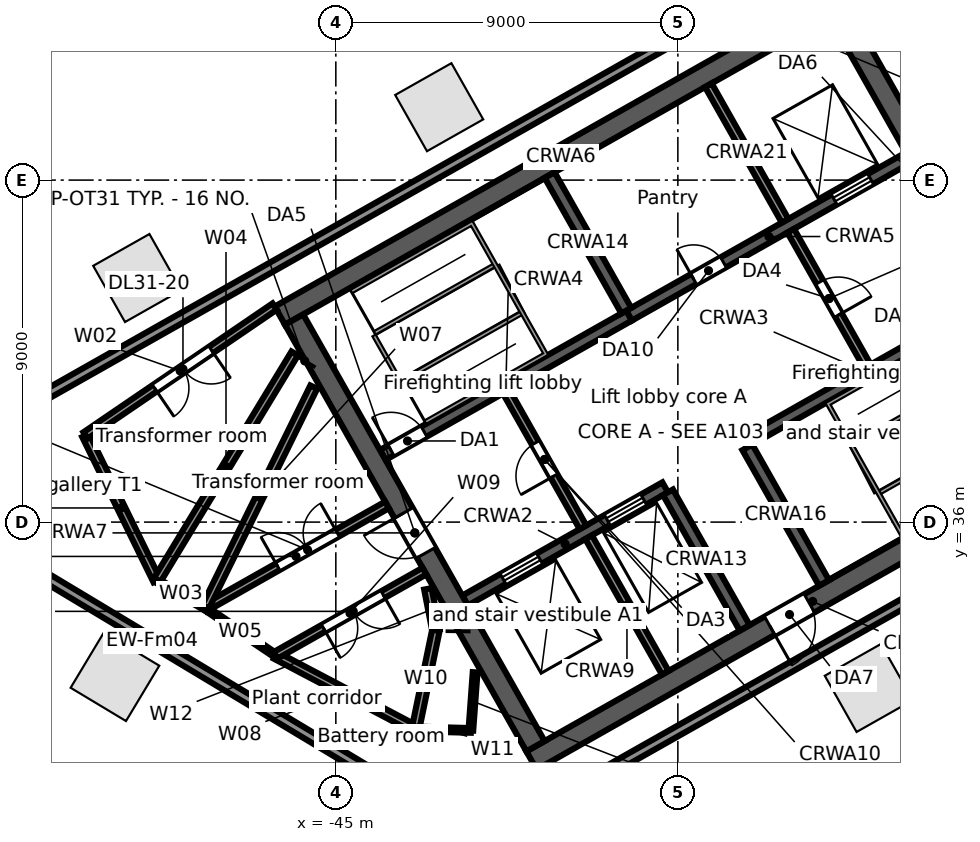
"""IFC4 building model, lengths in metres.
Left out: names, types, materials, properties, quantities, classifications, styles, units other than length and angle.
Written with IfcOpenShell. Run it as: python <this file> out.ifc"""

import sys

from ifc_helpers import new_model, si_unit, direction, frame, frame_2d, origin, origin_2d, place, context, subcontext, project, spatial, rectangle, extrude, element, fill, save


model = new_model("IFC4")
c1 = context("Model", 3, precision=1e-05, world=origin(), true_north=direction((0.0, 1.0)))
c2 = subcontext(c1, "Body", "Model", "MODEL_VIEW")
j1 = project(units=[si_unit("LENGTHUNIT", "METRE"), si_unit("PLANEANGLEUNIT", "RADIAN")], contexts=[c1])
p1 = place(None, origin())
s1 = spatial("IfcSite", under=j1, at=p1, CompositionType="ELEMENT")
p2 = place(p1, origin())
s2 = spatial("IfcBuilding", under=s1, at=p2, CompositionType="ELEMENT")
p3 = place(p2, frame((0.0, 0.0, 149.9)))
s3 = spatial("IfcBuildingStorey", under=s2, at=p3, CompositionType="ELEMENT", Elevation=149.9)
for number, where, z_axis, x_axis in (
    (1, (-42.28, 46.919, 0.0), (0.0, 0.0, 1.0), (-0.87, -0.492, 0.0)),
    (2, (-50.226, 42.423, 0.0), (0.0, 0.0, 1.0), (-0.87, -0.492, 0.0)),
    (3, (-50.812, 31.931, 0.0), (0.0, 0.0, 1.0), (0.857, -0.515, 0.0)),
    (4, (-30.976, 31.635, 0.0), (0.0, 0.0, 1.0), (0.87, 0.492, 0.0)),
):
    element("IfcColumn", number, at=place(p3, frame(where, z_axis=z_axis, x_axis=x_axis)), inside=s3, PredefinedType="COLUMN", context=c2, shape_type="SweptSolid", body=[
        extrude(rectangle(XDim=1.7, YDim=1.7, at=origin_2d()), origin(), (0.0, 0.0, 1.0), 5.0),
    ])
p4 = place(p3, frame((-56.251, 37.302, 0.0), z_axis=(0.0, 0.0, 1.0), x_axis=(0.87035543516, 0.49242402103, 0.0)))
e5 = element("IfcWall", 5, at=p4, inside=s3, PredefinedType="STANDARD", context=c2, shape_type="SweptSolid", body=[
    extrude(rectangle(XDim=62.067, YDim=0.25, at=frame_2d((31.033, 0.0))), origin(), (0.0, 0.0, 1.0), 3.872),
])
p5 = place(p3, frame((-43.407, 28.998, 0.0), z_axis=(0.0, 0.0, 1.0), x_axis=(-0.857168059559, 0.515036811958, 0.0)))
e6 = element("IfcWall", 6, at=p5, inside=s3, PredefinedType="STANDARD", context=c2, shape_type="SweptSolid", body=[
    extrude(rectangle(XDim=14.994, YDim=0.25, at=frame_2d((7.497, 0.0))), origin(), (0.0, 0.0, 1.0), 3.98),
])
p6 = place(p3, frame((-0.364, 50.666, 0.0), z_axis=(0.0, 0.0, 1.0), x_axis=(-0.870355021882, -0.492424751494, 0.0)))
e7 = element("IfcWall", 7, at=p6, inside=s3, PredefinedType="STANDARD", context=c2, shape_type="SweptSolid", body=[
    extrude(rectangle(XDim=44.126, YDim=0.25, at=frame_2d((22.063, 0.0))), origin(), (0.0, 0.0, 1.0), 3.768),
])
p7 = place(p3, frame((-39.85, 29.727, 0.0), z_axis=(0.0, 0.0, 1.0), x_axis=(0.870359753402, 0.492416388494, 0.0)))
e8 = element("IfcWall", 8, at=p7, inside=s3, PredefinedType="SOLIDWALL", context=c2, shape_type="SweptSolid", body=[
    extrude(rectangle(XDim=17.0, YDim=0.55, at=frame_2d((8.5, 0.0))), origin(), (0.0, 0.0, 1.0), 4.68),
])
p8 = place(p7, frame((7.2, 0.0, 0.0)))
e9 = element("IfcOpeningElement", 9, at=p8, cuts=e8, PredefinedType="OPENING", context=c2, shape_type="SweptSolid", body=[
    extrude(rectangle(XDim=1.2, YDim=2.1, at=frame_2d((0.6, 1.05))), frame((0.0, 0.285, 0.0), z_axis=(0.0, -1.0, 0.0), x_axis=(1.0, 0.0, 0.0)), (0.0, 0.0, 1.0), 0.57),
])
p9 = place(p3, frame((-41.6, 33.936, 0.0), z_axis=(0.0, 0.0, 1.0), x_axis=(0.870348557882, 0.492436176365, 0.0)))
e10 = element("IfcWall", 10, at=p9, inside=s3, PredefinedType="SOLIDWALL", context=c2, shape_type="SweptSolid", body=[
    extrude(rectangle(XDim=6.05, YDim=0.3, at=frame_2d((3.025, 0.0))), origin(), (0.0, 0.0, 1.0), 4.68),
])
p10 = place(p9, frame((1.15, 0.0, 0.0)))
e11 = element("IfcOpeningElement", 11, at=p10, cuts=e10, PredefinedType="OPENING", context=c2, shape_type="SweptSolid", body=[
    extrude(rectangle(XDim=1.1, YDim=2.1, at=frame_2d((0.55, 1.05))), frame((0.0, 0.16, 0.0), z_axis=(0.0, -1.0, 0.0), x_axis=(1.0, 0.0, 0.0)), (0.0, 0.0, 1.0), 0.32),
])
p11 = place(p9, frame((4.3, 0.0, 0.0)))
e12 = element("IfcOpeningElement", 12, at=p11, cuts=e10, PredefinedType="OPENING", context=c2, shape_type="SweptSolid", body=[
    extrude(rectangle(XDim=1.1, YDim=2.1, at=frame_2d((0.55, 1.05))), frame((0.0, 0.16, 0.0), z_axis=(0.0, -1.0, 0.0), x_axis=(1.0, 0.0, 0.0)), (0.0, 0.0, 1.0), 0.32),
])
p12 = place(p3, frame((-34.245, 38.097, 0.0), z_axis=(0.0, 0.0, 1.0), x_axis=(0.870360741098, 0.49241464271, 0.0)))
e13 = element("IfcWall", 13, at=p12, inside=s3, PredefinedType="SOLIDWALL", context=c2, shape_type="SweptSolid", body=[
    extrude(rectangle(XDim=7.45, YDim=0.3, at=frame_2d((3.725, 0.0))), origin(), (0.0, 0.0, 1.0), 4.68),
])
p13 = place(p12, frame((6.2, 0.0, 0.0)))
e14 = element("IfcOpeningElement", 14, at=p13, cuts=e13, PredefinedType="OPENING", context=c2, shape_type="SweptSolid", body=[
    extrude(rectangle(XDim=1.0, YDim=2.1, at=frame_2d((0.5, 1.05))), frame((0.0, 0.16, 0.0), z_axis=(0.0, -1.0, 0.0), x_axis=(1.0, 0.0, 0.0)), (0.0, 0.0, 1.0), 0.32),
])
p14 = place(p3, frame((-43.766, 37.766, 0.0), z_axis=(0.0, 0.0, 1.0), x_axis=(0.870346696097, 0.492439466932, 0.0)))
e15 = element("IfcWall", 15, at=p14, inside=s3, PredefinedType="SOLIDWALL", context=c2, shape_type="SweptSolid", body=[
    extrude(rectangle(XDim=7.45, YDim=0.3, at=frame_2d((3.725, 0.0))), origin(), (0.0, 0.0, 1.0), 4.68),
])
p15 = place(p14, frame((0.25, 0.0, 0.0)))
e16 = element("IfcOpeningElement", 16, at=p15, cuts=e15, PredefinedType="OPENING", context=c2, shape_type="SweptSolid", body=[
    extrude(rectangle(XDim=1.0, YDim=2.1, at=frame_2d((0.5, 1.05))), frame((0.0, 0.16, 0.0), z_axis=(0.0, -1.0, 0.0), x_axis=(1.0, 0.0, 0.0)), (0.0, 0.0, 1.0), 0.32),
])
p16 = place(p3, frame((-37.282, 41.435, 0.0), z_axis=(0.0, 0.0, 1.0), x_axis=(0.870359895813, 0.492416136779, 0.0)))
e17 = element("IfcWall", 17, at=p16, inside=s3, PredefinedType="SOLIDWALL", context=c2, shape_type="SweptSolid", body=[
    extrude(rectangle(XDim=8.45, YDim=0.3, at=frame_2d((4.225, 0.0))), origin(), (0.0, 0.0, 1.0), 4.68),
])
p17 = place(p16, frame((6.2, 0.0, 0.0)))
e18 = element("IfcOpeningElement", 18, at=p17, cuts=e17, PredefinedType="OPENING", context=c2, shape_type="SweptSolid", body=[
    extrude(rectangle(XDim=1.1, YDim=2.1, at=frame_2d((0.55, 1.05))), frame((0.0, 0.16, 0.0), z_axis=(0.0, -1.0, 0.0), x_axis=(1.0, 0.0, 0.0)), (0.0, 0.0, 1.0), 0.32),
])
p18 = place(p16, frame((1.95, 0.0, 0.0)))
e19 = element("IfcOpeningElement", 19, at=p18, cuts=e17, PredefinedType="OPENING", context=c2, shape_type="SweptSolid", body=[
    extrude(rectangle(XDim=0.9, YDim=2.1, at=frame_2d((0.45, 1.05))), frame((0.0, 0.16, 0.0), z_axis=(0.0, -1.0, 0.0), x_axis=(1.0, 0.0, 0.0)), (0.0, 0.0, 1.0), 0.32),
])
p19 = place(p3, frame((-46.473, 41.434, 0.0), z_axis=(0.0, 0.0, 1.0), x_axis=(0.870359753402, 0.492416388494, 0.0)))
e20 = element("IfcWall", 20, at=p19, inside=s3, PredefinedType="SOLIDWALL", context=c2, shape_type="SweptSolid", body=[
    extrude(rectangle(XDim=17.0, YDim=0.55, at=frame_2d((8.5, 0.0))), origin(), (0.0, 0.0, 1.0), 4.68),
])
p20 = place(p3, frame((-46.098, 41.33, 0.0), z_axis=(0.0, 0.0, 1.0), x_axis=(0.492418910884, -0.870358326325, 0.0)))
e21 = element("IfcWall", 21, at=p20, inside=s3, PredefinedType="SOLIDWALL", context=c2, shape_type="SweptSolid", body=[
    extrude(rectangle(XDim=12.9, YDim=0.55, at=frame_2d((6.45, 0.0))), origin(), (0.0, 0.0, 1.0), 4.68),
])
p21 = place(p20, frame((5.85, 0.0, 0.0)))
e22 = element("IfcOpeningElement", 22, at=p21, cuts=e21, PredefinedType="OPENING", context=c2, shape_type="SweptSolid", body=[
    extrude(rectangle(XDim=1.2, YDim=2.1, at=frame_2d((0.6, 1.05))), frame((0.0, 0.285, 0.0), z_axis=(0.0, -1.0, 0.0), x_axis=(1.0, 0.0, 0.0)), (0.0, 0.0, 1.0), 0.57),
])
p22 = place(p3, frame((-38.349, 35.603, 0.0), z_axis=(0.0, 0.0, 1.0), x_axis=(0.492382931784, -0.870378681085, 0.0)))
e23 = element("IfcWall", 23, at=p22, inside=s3, PredefinedType="SOLIDWALL", context=c2, shape_type="SweptSolid", body=[
    extrude(rectangle(XDim=4.1, YDim=0.2, at=frame_2d((2.05, 0.0))), origin(), (0.0, 0.0, 1.0), 4.68),
])
p23 = place(p3, frame((-40.516, 39.433, 0.0), z_axis=(0.0, 0.0, 1.0), x_axis=(0.492453559952, -0.87033872216, 0.0)))
e24 = element("IfcWall", 24, at=p23, inside=s3, PredefinedType="PARTITIONING", context=c2, shape_type="SweptSolid", body=[
    extrude(rectangle(XDim=4.1, YDim=0.2, at=frame_2d((2.05, 0.0))), origin(), (0.0, 0.0, 1.0), 4.68),
])
p24 = place(p23, frame((1.55, 0.0, 0.0)))
e25 = element("IfcOpeningElement", 25, at=p24, cuts=e24, PredefinedType="OPENING", context=c2, shape_type="SweptSolid", body=[
    extrude(rectangle(XDim=1.0, YDim=2.1, at=frame_2d((0.5, 1.05))), frame((0.0, 0.11, 0.0), z_axis=(0.0, -1.0, 0.0), x_axis=(1.0, 0.0, 0.0)), (0.0, 0.0, 1.0), 0.22),
])
p25 = place(p3, frame((-36.26, 36.785, 0.0), z_axis=(0.0, 0.0, 1.0), x_axis=(0.492408451753, -0.87036424366, 0.0)))
e26 = element("IfcWall", 26, at=p25, inside=s3, PredefinedType="SOLIDWALL", context=c2, shape_type="SweptSolid", body=[
    extrude(rectangle(XDim=4.1, YDim=0.3, at=frame_2d((2.05, 0.0))), origin(), (0.0, 0.0, 1.0), 4.68),
])
for number, where, z_axis, x_axis in (
    (27, (-39.375, 45.134, 0.0), (0.0, 0.0, 1.0), (0.492, -0.87, 0.0)),
    (28, (-34.171, 37.967, 0.0), (0.0, 0.0, 1.0), (0.492, -0.87, 0.0)),
):
    element("IfcWall", number, at=place(p3, frame(where, z_axis=z_axis, x_axis=x_axis)), inside=s3, PredefinedType="SOLIDWALL", context=c2, shape_type="SweptSolid", body=[
        extrude(rectangle(XDim=4.1, YDim=0.3, at=frame_2d((2.05, 0.0))), origin(), (0.0, 0.0, 1.0), 4.68),
    ])
p26 = place(p3, frame((-33.031, 43.667, 0.0), z_axis=(0.0, 0.0, 1.0), x_axis=(0.492408451753, -0.87036424366, 0.0)))
e29 = element("IfcWall", 29, at=p26, inside=s3, PredefinedType="PARTITIONING", context=c2, shape_type="SweptSolid", body=[
    extrude(rectangle(XDim=4.1, YDim=0.2, at=frame_2d((2.05, 0.0))), origin(), (0.0, 0.0, 1.0), 4.68),
])
p27 = place(p26, frame((1.55, 0.0, 0.0)))
e30 = element("IfcOpeningElement", 30, at=p27, cuts=e29, PredefinedType="OPENING", context=c2, shape_type="SweptSolid", body=[
    extrude(rectangle(XDim=1.0, YDim=2.1, at=frame_2d((0.5, 1.05))), frame((0.0, 0.11, 0.0), z_axis=(0.0, -1.0, 0.0), x_axis=(1.0, 0.0, 0.0)), (0.0, 0.0, 1.0), 0.22),
])
p28 = place(p3, frame((-35.197, 47.497, 0.0), z_axis=(0.0, 0.0, 1.0), x_axis=(0.492453559952, -0.87033872216, 0.0)))
e31 = element("IfcWall", 31, at=p28, inside=s3, PredefinedType="SOLIDWALL", context=c2, shape_type="SweptSolid", body=[
    extrude(rectangle(XDim=4.1, YDim=0.2, at=frame_2d((2.05, 0.0))), origin(), (0.0, 0.0, 1.0), 4.68),
])
p29 = place(p3, frame((-31.781, 49.43, 0.0), z_axis=(0.0, 0.0, 1.0), x_axis=(0.492427022044, -0.870353737259, 0.0)))
e32 = element("IfcWall", 32, at=p29, inside=s3, PredefinedType="SOLIDWALL", context=c2, shape_type="SweptSolid", body=[
    extrude(rectangle(XDim=12.9, YDim=0.55, at=frame_2d((6.45, 0.0))), origin(), (0.0, 0.0, 1.0), 4.68),
])
p30 = place(p29, frame((5.85, 0.0, 0.0)))
e33 = element("IfcOpeningElement", 33, at=p30, cuts=e32, PredefinedType="OPENING", context=c2, shape_type="SweptSolid", body=[
    extrude(rectangle(XDim=1.2, YDim=2.1, at=frame_2d((0.6, 1.05))), frame((0.0, 0.285, 0.0), z_axis=(0.0, -1.0, 0.0), x_axis=(1.0, 0.0, 0.0)), (0.0, 0.0, 1.0), 0.57),
])
p31 = place(p3, frame((-51.584, 38.283, 0.0), z_axis=(0.0, 0.0, 1.0), x_axis=(0.440433715159, -0.897785131616, 0.0)))
e34 = element("IfcWall", 34, at=p31, inside=s3, PredefinedType="PARTITIONING", context=c2, shape_type="SweptSolid", body=[
    extrude(rectangle(XDim=4.257, YDim=0.2, at=frame_2d((2.128, 0.0))), origin(), (0.0, 0.0, 1.0), 4.68),
])
p32 = place(p3, frame((-51.584, 38.283, 0.0), z_axis=(0.0, 0.0, 1.0), x_axis=(0.826380028005, 0.563112821124, 0.0)))
e35 = element("IfcWall", 35, at=p32, inside=s3, PredefinedType="PARTITIONING", context=c2, shape_type="SweptSolid", body=[
    extrude(rectangle(XDim=6.02, YDim=0.2, at=frame_2d((3.01, 0.0))), origin(), (0.0, 0.0, 1.0), 4.68),
])
p33 = place(p32, frame((2.2, 0.0, 0.0)))
e36 = element("IfcOpeningElement", 36, at=p33, cuts=e35, PredefinedType="OPENING", context=c2, shape_type="SweptSolid", body=[
    extrude(rectangle(XDim=1.8, YDim=2.1, at=frame_2d((0.9, 1.05))), frame((0.0, 0.11, 0.0), z_axis=(0.0, -1.0, 0.0), x_axis=(1.0, 0.0, 0.0)), (0.0, 0.0, 1.0), 0.22),
])
p34 = place(p3, frame((-49.701, 34.456, 0.0), z_axis=(0.0, 0.0, 1.0), x_axis=(0.869993053358, -0.493063978718, 0.0)))
e37 = element("IfcWall", 37, at=p34, inside=s3, PredefinedType="PARTITIONING", context=c2, shape_type="SweptSolid", body=[
    extrude(rectangle(XDim=1.438, YDim=0.125, at=frame_2d((0.719, 0.0))), origin(), (0.0, 0.0, 1.0), 4.411),
])
p35 = place(p3, frame((-49.698, 34.48, 0.0), z_axis=(0.0, 0.0, 1.0), x_axis=(0.518831868334, 0.854876302398, 0.0)))
e38 = element("IfcWall", 38, at=p35, inside=s3, PredefinedType="PARTITIONING", context=c2, shape_type="SweptSolid", body=[
    extrude(rectangle(XDim=6.969, YDim=0.2, at=frame_2d((3.485, 0.0))), origin(), (0.0, 0.0, 1.0), 4.68),
])
p36 = place(p3, frame((-48.441, 33.742, 0.0), z_axis=(0.0, 0.0, 1.0), x_axis=(0.829690845398, -0.558223164211, 0.0)))
e39 = element("IfcWall", 39, at=p36, inside=s3, PredefinedType="PARTITIONING", context=c2, shape_type="SweptSolid", body=[
    extrude(rectangle(XDim=2.236, YDim=0.125, at=frame_2d((1.118, 0.0))), origin(), (0.0, 0.0, 1.0), 3.96),
])
p37 = place(p3, frame((-48.441, 33.742, 0.0), z_axis=(0.0, 0.0, 1.0), x_axis=(0.870300652468, 0.492520836425, 0.0)))
e40 = element("IfcWall", 40, at=p37, inside=s3, PredefinedType="PARTITIONING", context=c2, shape_type="SweptSolid", body=[
    extrude(rectangle(XDim=5.5, YDim=0.2, at=frame_2d((2.75, 0.0))), origin(), (0.0, 0.0, 1.0), 4.68),
])
p38 = place(p37, frame((2.2, 0.0, 0.0)))
e41 = element("IfcOpeningElement", 41, at=p38, cuts=e40, PredefinedType="OPENING", context=c2, shape_type="SweptSolid", body=[
    extrude(rectangle(XDim=1.8, YDim=2.1, at=frame_2d((0.9, 1.05))), frame((0.0, 0.11, 0.0), z_axis=(0.0, -1.0, 0.0), x_axis=(1.0, 0.0, 0.0)), (0.0, 0.0, 1.0), 0.22),
])
p39 = place(p3, frame((-48.429, 33.767, 0.0), z_axis=(0.0, 0.0, 1.0), x_axis=(0.441676991993, 0.897174138472, 0.0)))
e42 = element("IfcWall", 42, at=p39, inside=s3, PredefinedType="PARTITIONING", context=c2, shape_type="SweptSolid", body=[
    extrude(rectangle(XDim=6.448, YDim=0.2, at=frame_2d((3.224, 0.0))), origin(), (0.0, 0.0, 1.0), 4.68),
])
p40 = place(p3, frame((-46.586, 32.494, 0.0), z_axis=(0.0, 0.0, 1.0), x_axis=(0.884902948151, -0.465775452717, 0.0)))
e43 = element("IfcWall", 43, at=p40, inside=s3, PredefinedType="PARTITIONING", context=c2, shape_type="SweptSolid", body=[
    extrude(rectangle(XDim=4.161, YDim=0.2, at=frame_2d((2.081, 0.0))), origin(), (0.0, 0.0, 1.0), 4.68),
])
p41 = place(p3, frame((-46.586, 32.494, 0.0), z_axis=(0.0, 0.0, 1.0), x_axis=(0.87036170491, 0.492412939134, 0.0)))
e44 = element("IfcWall", 44, at=p41, inside=s3, PredefinedType="PARTITIONING", context=c2, shape_type="SweptSolid", body=[
    extrude(rectangle(XDim=4.5, YDim=0.2, at=frame_2d((2.25, 0.0))), origin(), (0.0, 0.0, 1.0), 4.68),
])
p42 = place(p41, frame((1.45, 0.0, 0.0)))
e45 = element("IfcOpeningElement", 45, at=p42, cuts=e44, PredefinedType="OPENING", context=c2, shape_type="SweptSolid", body=[
    extrude(rectangle(XDim=1.8, YDim=2.1, at=frame_2d((0.9, 1.05))), frame((0.0, 0.11, 0.0), z_axis=(0.0, -1.0, 0.0), x_axis=(1.0, 0.0, 0.0)), (0.0, 0.0, 1.0), 0.22),
])
p43 = place(p3, frame((-42.9, 30.576, 0.0), z_axis=(0.0, 0.0, 1.0), x_axis=(0.202504561786, 0.979281319364, 0.0)))
e46 = element("IfcWall", 46, at=p43, inside=s3, PredefinedType="PARTITIONING", context=c2, shape_type="SweptSolid", body=[
    extrude(rectangle(XDim=2.637, YDim=0.2, at=frame_2d((1.318, 0.0))), origin(), (0.0, 0.0, 1.0), 4.68),
])
p44 = place(p3, frame((-42.894, 30.556, 0.0), z_axis=(0.0, 0.0, 1.0), x_axis=(0.999658224557, -0.026142572095, 0.0)))
e47 = element("IfcWall", 47, at=p44, inside=s3, PredefinedType="PARTITIONING", context=c2, shape_type="SweptSolid", body=[
    extrude(rectangle(XDim=1.448, YDim=0.125, at=frame_2d((0.724, 0.0))), origin(), (0.0, 0.0, 1.0), 4.411),
])
p45 = place(p3, frame((-42.578, 34.244, 0.0), z_axis=(0.0, 0.0, 1.0), x_axis=(0.19153109743, -0.981486545357, 0.0)))
e48 = element("IfcWall", 48, at=p45, inside=s3, PredefinedType="PARTITIONING", context=c2, shape_type="SweptSolid", body=[
    extrude(rectangle(XDim=1.106, YDim=0.2, at=frame_2d((0.553, 0.0))), origin(), (0.0, 0.0, 1.0), 4.68),
])
p46 = place(p3, frame((-41.447, 30.518, 0.0), z_axis=(0.0, 0.0, 1.0), x_axis=(0.073091534981, 0.997325236577, 0.0)))
e49 = element("IfcWall", 49, at=p46, inside=s3, PredefinedType="PARTITIONING", context=c2, shape_type="SweptSolid", body=[
    extrude(rectangle(XDim=1.533, YDim=0.125, at=frame_2d((0.767, 0.0))), origin(), (0.0, 0.0, 1.0), 4.68),
])
p47 = place(p17, origin())
e50 = element("IfcDoor", 50, at=p47, inside=s3, OperationType="DOUBLE_DOOR_SLIDING", PredefinedType="DOOR", context=c2, shape_type="SweptSolid", body=[
    extrude(rectangle(XDim=1.1, YDim=2.1, at=frame_2d((0.55, 1.05))), frame((0.0, 0.025, 0.0), z_axis=(0.0, -1.0, 0.0), x_axis=(1.0, 0.0, 0.0)), (0.0, 0.0, 1.0), 0.05),
])
fill(e18, e50)
p48 = place(p10, origin())
e51 = element("IfcDoor", 51, at=p48, inside=s3, OperationType="DOUBLE_DOOR_SLIDING", PredefinedType="DOOR", context=c2, shape_type="SweptSolid", body=[
    extrude(rectangle(XDim=1.1, YDim=2.1, at=frame_2d((0.55, 1.05))), frame((0.0, 0.025, 0.0), z_axis=(0.0, -1.0, 0.0), x_axis=(1.0, 0.0, 0.0)), (0.0, 0.0, 1.0), 0.05),
])
fill(e11, e51)
p49 = place(p11, origin())
e52 = element("IfcDoor", 52, at=p49, inside=s3, OperationType="DOUBLE_DOOR_SLIDING", PredefinedType="DOOR", context=c2, shape_type="SweptSolid", body=[
    extrude(rectangle(XDim=1.1, YDim=2.1, at=frame_2d((0.55, 1.05))), frame((0.0, 0.025, 0.0), z_axis=(0.0, -1.0, 0.0), x_axis=(1.0, 0.0, 0.0)), (0.0, 0.0, 1.0), 0.05),
])
fill(e12, e52)
p50 = place(p15, origin())
e53 = element("IfcDoor", 53, at=p50, inside=s3, OperationType="SINGLE_SWING_LEFT", PredefinedType="DOOR", context=c2, shape_type="SweptSolid", body=[
    extrude(rectangle(XDim=1.0, YDim=2.1, at=frame_2d((0.5, 1.05))), frame((0.0, 0.025, 0.0), z_axis=(0.0, -1.0, 0.0), x_axis=(1.0, 0.0, 0.0)), (0.0, 0.0, 1.0), 0.05),
])
fill(e16, e53)
p51 = place(p24, frame((1.0, 0.0, 0.0), z_axis=(0.0, 0.0, 1.0), x_axis=(-1.0, 0.0, 0.0)))
e54 = element("IfcDoor", 54, at=p51, inside=s3, OperationType="SINGLE_SWING_LEFT", PredefinedType="DOOR", context=c2, shape_type="SweptSolid", body=[
    extrude(rectangle(XDim=1.0, YDim=2.1, at=frame_2d((0.5, 1.05))), frame((0.0, 0.025, 0.0), z_axis=(0.0, -1.0, 0.0), x_axis=(1.0, 0.0, 0.0)), (0.0, 0.0, 1.0), 0.05),
])
fill(e25, e54)
p52 = place(p21, frame((1.2, 0.0, 0.0), z_axis=(0.0, 0.0, 1.0), x_axis=(-1.0, 0.0, 0.0)))
e55 = element("IfcDoor", 55, at=p52, inside=s3, OperationType="SINGLE_SWING_RIGHT", PredefinedType="DOOR", context=c2, shape_type="SweptSolid", body=[
    extrude(rectangle(XDim=1.2, YDim=2.1, at=frame_2d((0.6, 1.05))), frame((0.0, 0.025, 0.0), z_axis=(0.0, -1.0, 0.0), x_axis=(1.0, 0.0, 0.0)), (0.0, 0.0, 1.0), 0.05),
])
fill(e22, e55)
p53 = place(p27, origin())
e56 = element("IfcDoor", 56, at=p53, inside=s3, OperationType="SINGLE_SWING_RIGHT", PredefinedType="DOOR", context=c2, shape_type="SweptSolid", body=[
    extrude(rectangle(XDim=1.0, YDim=2.1, at=frame_2d((0.5, 1.05))), frame((0.0, 0.025, 0.0), z_axis=(0.0, -1.0, 0.0), x_axis=(1.0, 0.0, 0.0)), (0.0, 0.0, 1.0), 0.05),
])
fill(e30, e56)
p54 = place(p8, frame((1.2, 0.0, 0.0), z_axis=(0.0, 0.0, 1.0), x_axis=(-1.0, 0.0, 0.0)))
e57 = element("IfcDoor", 57, at=p54, inside=s3, OperationType="SINGLE_SWING_RIGHT", PredefinedType="DOOR", context=c2, shape_type="SweptSolid", body=[
    extrude(rectangle(XDim=1.2, YDim=2.1, at=frame_2d((0.6, 1.05))), frame((0.0, 0.025, 0.0), z_axis=(0.0, -1.0, 0.0), x_axis=(1.0, 0.0, 0.0)), (0.0, 0.0, 1.0), 0.05),
])
fill(e9, e57)
p55 = place(p18, origin())
e58 = element("IfcDoor", 58, at=p55, inside=s3, OperationType="SINGLE_SWING_LEFT", PredefinedType="DOOR", context=c2, shape_type="SweptSolid", body=[
    extrude(rectangle(XDim=0.9, YDim=2.1, at=frame_2d((0.45, 1.05))), frame((0.0, 0.025, 0.0), z_axis=(0.0, -1.0, 0.0), x_axis=(1.0, 0.0, 0.0)), (0.0, 0.0, 1.0), 0.05),
])
fill(e19, e58)
p56 = place(p38, origin())
e59 = element("IfcDoor", 59, at=p56, inside=s3, OperationType="DOUBLE_DOOR_SINGLE_SWING", PredefinedType="DOOR", context=c2, shape_type="SweptSolid", body=[
    extrude(rectangle(XDim=1.8, YDim=2.1, at=frame_2d((0.9, 1.05))), frame((0.0, 0.025, 0.0), z_axis=(0.0, -1.0, 0.0), x_axis=(1.0, 0.0, 0.0)), (0.0, 0.0, 1.0), 0.05),
])
fill(e41, e59)
p57 = place(p42, frame((1.8, 0.0, 0.0), z_axis=(0.0, 0.0, 1.0), x_axis=(-1.0, 0.0, 0.0)))
e60 = element("IfcDoor", 60, at=p57, inside=s3, OperationType="DOUBLE_DOOR_SINGLE_SWING", PredefinedType="DOOR", context=c2, shape_type="SweptSolid", body=[
    extrude(rectangle(XDim=1.8, YDim=2.1, at=frame_2d((0.9, 1.05))), frame((0.0, 0.025, 0.0), z_axis=(0.0, -1.0, 0.0), x_axis=(1.0, 0.0, 0.0)), (0.0, 0.0, 1.0), 0.05),
])
fill(e45, e60)
p58 = place(p33, frame((1.8, 0.0, 0.0), z_axis=(0.0, 0.0, 1.0), x_axis=(-1.0, 0.0, 0.0)))
e61 = element("IfcDoor", 61, at=p58, inside=s3, OperationType="DOUBLE_DOOR_SINGLE_SWING", PredefinedType="DOOR", context=c2, shape_type="SweptSolid", body=[
    extrude(rectangle(XDim=1.8, YDim=2.1, at=frame_2d((0.9, 1.05))), frame((0.0, 0.025, 0.0), z_axis=(0.0, -1.0, 0.0), x_axis=(1.0, 0.0, 0.0)), (0.0, 0.0, 1.0), 0.05),
])
fill(e36, e61)
save(model, sys.argv[1])
